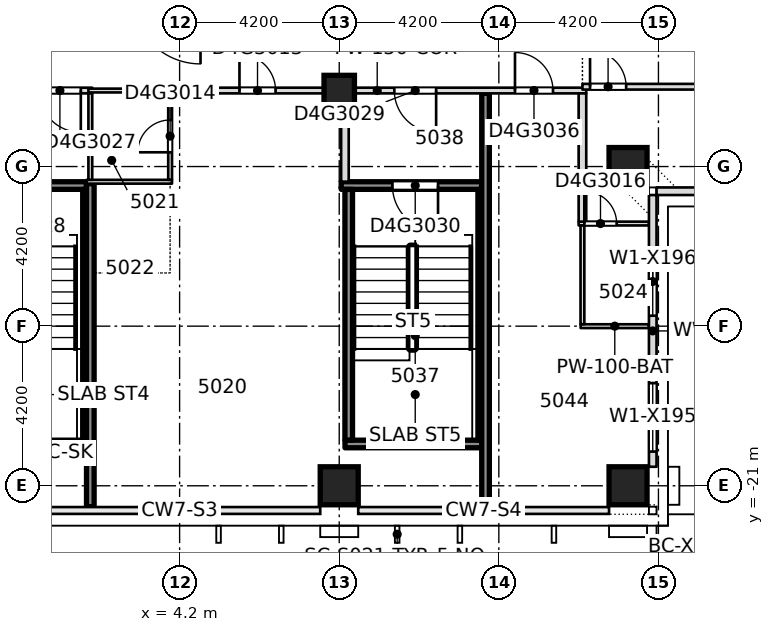
"""IFC4 building model, lengths in metres.
Left out: names, types, materials, properties, quantities, classifications, styles, units other than length and angle.
Written with IfcOpenShell. Run it as: python <this file> out.ifc"""

import sys

from ifc_helpers import new_model, si_unit, direction, frame, frame_2d, origin, origin_2d, place, context, subcontext, project, spatial, rectangle, extrude, element, fill, save


model = new_model("IFC4")
c1 = context("Model", 3, precision=1e-05, world=origin(), true_north=direction((0.0, 1.0)))
c2 = subcontext(c1, "Body", "Model", "MODEL_VIEW")
j1 = project(units=[si_unit("LENGTHUNIT", "METRE"), si_unit("PLANEANGLEUNIT", "RADIAN")], contexts=[c1])
p1 = place(None, origin())
s1 = spatial("IfcSite", under=j1, at=p1, CompositionType="ELEMENT")
p2 = place(p1, origin())
s2 = spatial("IfcBuilding", under=s1, at=p2, CompositionType="ELEMENT")
p3 = place(p2, frame((0.0, 0.0, 192.8)))
s3 = spatial("IfcBuildingStorey", under=s2, at=p3, CompositionType="ELEMENT", Elevation=192.8)
for number, where, z_axis, x_axis in (
    (1, (8.4, -21.0, -0.4), (0.0, 0.0, 1.0), (1.0, 0.0, 0.0)),
    (2, (16.0, -21.0, -0.4), (0.0, 0.0, 1.0), (1.0, 0.0, 0.0)),
    (3, (16.0, -12.6, -0.4), (0.0, 0.0, 1.0), (1.0, 0.0, 0.0)),
):
    element("IfcColumn", number, at=place(p3, frame(where, z_axis=z_axis, x_axis=x_axis)), inside=s3, PredefinedType="COLUMN", context=c2, shape_type="SweptSolid", body=[
        extrude(rectangle(XDim=1.0, YDim=1.0, at=origin_2d()), origin(), (0.0, 0.0, 1.0), 3.45),
    ])
p4 = place(p3, frame((8.4, -10.6, -0.4), z_axis=(0.0, 0.0, 1.0), x_axis=(1.0, 0.0, 0.0)))
e4 = element("IfcColumn", 4, at=p4, inside=s3, PredefinedType="COLUMN", context=c2, shape_type="SweptSolid", body=[
    extrude(rectangle(XDim=0.8, YDim=0.8, at=origin_2d()), origin(), (0.0, 0.0, 1.0), 3.45),
])
p5 = place(p3, frame((-1.848, -19.9, 0.0), z_axis=(0.0, 0.0, 1.0), x_axis=(1.0, 0.0, 0.0)))
e5 = element("IfcWall", 5, at=p5, inside=s3, PredefinedType="SOLIDWALL", context=c2, shape_type="SweptSolid", body=[
    extrude(rectangle(XDim=3.696, YDim=0.2, at=frame_2d((1.848, 0.0))), origin(), (0.0, 0.0, 1.0), 3.05),
])
p6 = place(p3, frame((8.552, -19.9, 0.0), z_axis=(0.0, 0.0, 1.0), x_axis=(1.0, 0.0, 0.0)))
e6 = element("IfcWall", 6, at=p6, inside=s3, PredefinedType="SOLIDWALL", context=c2, shape_type="SweptSolid", body=[
    extrude(rectangle(XDim=3.696, YDim=0.2, at=frame_2d((1.848, 0.0))), origin(), (0.0, 0.0, 1.0), 3.05),
])
p7 = place(p3, frame((14.752, -16.8, 0.0), z_axis=(0.0, 0.0, 1.0), x_axis=(1.0, 0.0, 0.0)))
e7 = element("IfcWall", 7, at=p7, inside=s3, PredefinedType="PARTITIONING", context=c2, shape_type="SweptSolid", body=[
    extrude(rectangle(XDim=1.798, YDim=0.1, at=frame_2d((0.899, 0.0))), origin(), (0.0, 0.0, 1.0), 3.05),
])
p8 = place(p3, frame((14.7, -14.1, 0.0), z_axis=(0.0, 0.0, 1.0), x_axis=(1.0, 0.0, 0.0)))
e8 = element("IfcWall", 8, at=p8, inside=s3, PredefinedType="PARTITIONING", context=c2, shape_type="SweptSolid", body=[
    extrude(rectangle(XDim=1.85, YDim=0.1, at=frame_2d((0.925, 0.0))), origin(), (0.0, 0.0, 1.0), 3.05),
])
p9 = place(p8, frame((0.15, 0.0, 0.0)))
e9 = element("IfcOpeningElement", 9, at=p9, cuts=e8, PredefinedType="OPENING", context=c2, shape_type="SweptSolid", body=[
    extrude(rectangle(XDim=0.85, YDim=2.1, at=frame_2d((0.425, 1.05))), frame((0.0, 0.06, 0.0), z_axis=(0.0, -1.0, 0.0), x_axis=(1.0, 0.0, 0.0)), (0.0, 0.0, 1.0), 0.12),
])
p10 = place(p3, frame((-1.798, -13.1, 0.0), z_axis=(0.0, 0.0, 1.0), x_axis=(1.0, 0.0, 0.0)))
e10 = element("IfcWall", 10, at=p10, inside=s3, PredefinedType="SOLIDWALL", context=c2, shape_type="SweptSolid", body=[
    extrude(rectangle(XDim=3.546, YDim=0.2, at=frame_2d((1.773, 0.0))), origin(), (0.0, 0.0, 1.0), 3.05),
])
p11 = place(p10, frame((1.198, 0.0, 0.0)))
e11 = element("IfcOpeningElement", 11, at=p11, cuts=e10, PredefinedType="OPENING", context=c2, shape_type="SweptSolid", body=[
    extrude(rectangle(XDim=1.2, YDim=2.1, at=frame_2d((0.6, 1.05))), frame((0.0, 0.11, 0.0), z_axis=(0.0, -1.0, 0.0), x_axis=(1.0, 0.0, 0.0)), (0.0, 0.0, 1.0), 0.22),
])
p12 = place(p3, frame((8.452, -13.1, 0.0), z_axis=(0.0, 0.0, 1.0), x_axis=(1.0, 0.0, 0.0)))
e12 = element("IfcWall", 12, at=p12, inside=s3, PredefinedType="SOLIDWALL", context=c2, shape_type="SweptSolid", body=[
    extrude(rectangle(XDim=3.696, YDim=0.2, at=frame_2d((1.848, 0.0))), origin(), (0.0, 0.0, 1.0), 3.05),
])
p13 = place(p12, frame((1.348, 0.0, 0.0)))
e13 = element("IfcOpeningElement", 13, at=p13, cuts=e12, PredefinedType="OPENING", context=c2, shape_type="SweptSolid", body=[
    extrude(rectangle(XDim=1.2, YDim=2.1, at=frame_2d((0.6, 1.05))), frame((0.0, 0.11, 0.0), z_axis=(0.0, -1.0, 0.0), x_axis=(1.0, 0.0, 0.0)), (0.0, 0.0, 1.0), 0.22),
])
p14 = place(p3, frame((1.75, -13.0, 0.0), z_axis=(0.0, 0.0, 1.0), x_axis=(1.0, 0.0, 0.0)))
e14 = element("IfcWall", 14, at=p14, inside=s3, PredefinedType="PARTITIONING", context=c2, shape_type="SweptSolid", body=[
    extrude(rectangle(XDim=2.25, YDim=0.1, at=frame_2d((1.125, 0.0))), origin(), (0.0, 0.0, 1.0), 3.05),
])
p15 = place(p3, frame((-1.9, -10.6, 0.0), z_axis=(0.0, 0.0, 1.0), x_axis=(1.0, 0.0, 0.0)))
e15 = element("IfcWall", 15, at=p15, inside=s3, PredefinedType="PARTITIONING", context=c2, shape_type="SweptSolid", body=[
    extrude(rectangle(XDim=3.8, YDim=0.15, at=frame_2d((1.9, 0.0))), origin(), (0.0, 0.0, 1.0), 3.05),
])
p16 = place(p15, frame((2.4, 0.0, 0.0)))
e16 = element("IfcOpeningElement", 16, at=p16, cuts=e15, PredefinedType="OPENING", context=c2, shape_type="SweptSolid", body=[
    extrude(rectangle(XDim=1.1, YDim=2.1, at=frame_2d((0.55, 1.05))), frame((0.0, 0.085, 0.0), z_axis=(0.0, -1.0, 0.0), x_axis=(1.0, 0.0, 0.0)), (0.0, 0.0, 1.0), 0.17),
])
p17 = place(p3, frame((1.8, -10.6, 0.0), z_axis=(0.0, 0.0, 1.0), x_axis=(1.0, 0.0, 0.0)))
e17 = element("IfcWall", 17, at=p17, inside=s3, PredefinedType="PARTITIONING", context=c2, shape_type="SweptSolid", body=[
    extrude(rectangle(XDim=2.2, YDim=0.1, at=frame_2d((1.1, 0.0))), origin(), (0.0, 0.0, 1.0), 3.05),
])
p18 = place(p3, frame((3.9, -10.6, 0.0), z_axis=(0.0, 0.0, 1.0), x_axis=(1.0, 0.0, 0.0)))
e18 = element("IfcWall", 18, at=p18, inside=s3, PredefinedType="PARTITIONING", context=c2, shape_type="SweptSolid", body=[
    extrude(rectangle(XDim=11.0, YDim=0.15, at=frame_2d((5.5, 0.0))), origin(), (0.0, 0.0, 1.0), 3.05),
])
p19 = place(p18, frame((1.875, 0.0, 0.0)))
e19 = element("IfcOpeningElement", 19, at=p19, cuts=e18, PredefinedType="OPENING", context=c2, shape_type="SweptSolid", body=[
    extrude(rectangle(XDim=0.95, YDim=2.1, at=frame_2d((0.475, 1.05))), frame((0.0, 0.085, 0.0), z_axis=(0.0, -1.0, 0.0), x_axis=(1.0, 0.0, 0.0)), (0.0, 0.0, 1.0), 0.17),
])
p20 = place(p18, frame((5.95, 0.0, 0.0)))
e20 = element("IfcOpeningElement", 20, at=p20, cuts=e18, PredefinedType="OPENING", context=c2, shape_type="SweptSolid", body=[
    extrude(rectangle(XDim=1.1, YDim=2.1, at=frame_2d((0.55, 1.05))), frame((0.0, 0.085, 0.0), z_axis=(0.0, -1.0, 0.0), x_axis=(1.0, 0.0, 0.0)), (0.0, 0.0, 1.0), 0.17),
])
p21 = place(p18, frame((9.125, 0.0, 0.0)))
e21 = element("IfcOpeningElement", 21, at=p21, cuts=e18, PredefinedType="OPENING", context=c2, shape_type="SweptSolid", body=[
    extrude(rectangle(XDim=1.0, YDim=2.1, at=frame_2d((0.5, 1.05))), frame((0.0, 0.085, 0.0), z_axis=(0.0, -1.0, 0.0), x_axis=(1.0, 0.0, 0.0)), (0.0, 0.0, 1.0), 0.17),
])
p22 = place(p3, frame((14.8, -10.5, 0.0), z_axis=(0.0, 0.0, 1.0), x_axis=(1.0, 0.0, 0.0)))
e22 = element("IfcWall", 22, at=p22, inside=s3, PredefinedType="PARTITIONING", context=c2, shape_type="SweptSolid", body=[
    extrude(rectangle(XDim=10.95, YDim=0.15, at=frame_2d((5.475, 0.0))), origin(), (0.0, 0.0, 1.0), 3.05),
])
p23 = place(p22, frame((0.2, 0.0, 0.0)))
e23 = element("IfcOpeningElement", 23, at=p23, cuts=e22, PredefinedType="OPENING", context=c2, shape_type="SweptSolid", body=[
    extrude(rectangle(XDim=0.95, YDim=2.1, at=frame_2d((0.475, 1.05))), frame((0.0, 0.085, 0.0), z_axis=(0.0, -1.0, 0.0), x_axis=(1.0, 0.0, 0.0)), (0.0, 0.0, 1.0), 0.17),
])
p24 = place(p3, frame((1.75, -19.798, 0.0), z_axis=(0.0, 0.0, 1.0), x_axis=(0.0, 1.0, 0.0)))
e24 = element("IfcWall", 24, at=p24, inside=s3, PredefinedType="SOLIDWALL", context=c2, shape_type="SweptSolid", body=[
    extrude(rectangle(XDim=6.596, YDim=0.2, at=frame_2d((3.298, 0.0))), origin(), (0.0, 0.0, 1.0), 3.05),
])
p25 = place(p3, frame((1.85, -12.95, 0.0), z_axis=(0.0, 0.0, 1.0), x_axis=(0.0, 1.0, 0.0)))
e25 = element("IfcWall", 25, at=p25, inside=s3, PredefinedType="PARTITIONING", context=c2, shape_type="SweptSolid", body=[
    extrude(rectangle(XDim=2.275, YDim=0.1, at=frame_2d((1.137, 0.0))), origin(), (0.0, 0.0, 1.0), 3.05),
])
p26 = place(p3, frame((3.95, -12.95, 0.0), z_axis=(0.0, 0.0, 1.0), x_axis=(0.0, 1.0, 0.0)))
e26 = element("IfcWall", 26, at=p26, inside=s3, PredefinedType="PARTITIONING", context=c2, shape_type="SweptSolid", body=[
    extrude(rectangle(XDim=2.275, YDim=0.1, at=frame_2d((1.137, 0.0))), origin(), (0.0, 0.0, 1.0), 3.05),
])
p27 = place(p26, frame((0.725, 0.0, 0.0)))
e27 = element("IfcOpeningElement", 27, at=p27, cuts=e26, PredefinedType="OPENING", context=c2, shape_type="SweptSolid", body=[
    extrude(rectangle(XDim=0.85, YDim=2.1, at=frame_2d((0.425, 1.05))), frame((0.0, 0.06, 0.0), z_axis=(0.0, -1.0, 0.0), x_axis=(1.0, 0.0, 0.0)), (0.0, 0.0, 1.0), 0.12),
])
p28 = place(p3, frame((8.55, -12.998, 0.0), z_axis=(0.0, 0.0, 1.0), x_axis=(0.0, 1.0, 0.0)))
e28 = element("IfcWall", 28, at=p28, inside=s3, PredefinedType="PARTITIONING", context=c2, shape_type="SweptSolid", body=[
    extrude(rectangle(XDim=2.323, YDim=0.2, at=frame_2d((1.162, 0.0))), origin(), (0.0, 0.0, 1.0), 3.05),
])
for number, where, z_axis, x_axis in (
    (29, (8.65, -19.798, 0.0), (0.0, 0.0, 1.0), (0.0, 1.0, 0.0)),
    (30, (12.15, -19.798, 0.0), (0.0, 0.0, 1.0), (0.0, 1.0, 0.0)),
):
    element("IfcWall", number, at=place(p3, frame(where, z_axis=z_axis, x_axis=x_axis)), inside=s3, PredefinedType="SOLIDWALL", context=c2, shape_type="SweptSolid", body=[
        extrude(rectangle(XDim=6.596, YDim=0.2, at=frame_2d((3.298, 0.0))), origin(), (0.0, 0.0, 1.0), 3.05),
    ])
p29 = place(p3, frame((14.8, -16.748, 0.0), z_axis=(0.0, 0.0, 1.0), x_axis=(0.0, 1.0, 0.0)))
e31 = element("IfcWall", 31, at=p29, inside=s3, PredefinedType="PARTITIONING", context=c2, shape_type="SweptSolid", body=[
    extrude(rectangle(XDim=2.598, YDim=0.1, at=frame_2d((1.299, 0.0))), origin(), (0.0, 0.0, 1.0), 3.05),
])
p30 = place(p3, frame((14.8, -14.05, 0.0), z_axis=(0.0, 0.0, 1.0), x_axis=(0.0, 1.0, 0.0)))
e32 = element("IfcWall", 32, at=p30, inside=s3, PredefinedType="PARTITIONING", context=c2, shape_type="SweptSolid", body=[
    extrude(rectangle(XDim=3.375, YDim=0.2, at=frame_2d((1.688, 0.0))), origin(), (0.0, 0.0, 1.0), 3.05),
])
p31 = place(p3, frame((16.65, -20.5, 0.0), z_axis=(0.0, 0.0, 1.0), x_axis=(0.0, 1.0, 0.0)))
e33 = element("IfcWall", 33, at=p31, inside=s3, PredefinedType="STANDARD", context=c2, shape_type="SweptSolid", body=[
    extrude(rectangle(XDim=7.15, YDim=0.2, at=frame_2d((3.575, 0.0))), origin(), (0.0, 0.0, 1.0), 3.05),
])
p32 = place(p31, frame((0.4, 0.0, 0.2)))
e34 = element("IfcOpeningElement", 34, at=p32, cuts=e33, PredefinedType="OPENING", context=c2, shape_type="SweptSolid", body=[
    extrude(rectangle(XDim=1.8, YDim=2.65, at=frame_2d((0.9, 1.325))), frame((0.0, 0.11, 0.0), z_axis=(0.0, -1.0, 0.0), x_axis=(1.0, 0.0, 0.0)), (0.0, 0.0, 1.0), 0.22),
])
p33 = place(p31, frame((3.975, 0.0, 0.2)))
e35 = element("IfcOpeningElement", 35, at=p33, cuts=e33, PredefinedType="OPENING", context=c2, shape_type="SweptSolid", body=[
    extrude(rectangle(XDim=1.8, YDim=2.65, at=frame_2d((0.9, 1.325))), frame((0.0, 0.11, 0.0), z_axis=(0.0, -1.0, 0.0), x_axis=(1.0, 0.0, 0.0)), (0.0, 0.0, 1.0), 0.22),
])
p34 = place(p3, frame((16.75, -13.25, 0.0), z_axis=(0.0, 0.0, 1.0), x_axis=(1.0, 0.0, 0.0)))
e36 = element("IfcWall", 36, at=p34, inside=s3, PredefinedType="STANDARD", context=c2, shape_type="SweptSolid", body=[
    extrude(rectangle(XDim=7.95, YDim=0.2, at=frame_2d((3.975, 0.0))), origin(), (0.0, 0.0, 1.0), 3.05),
])
p35 = place(p3, frame((12.25, -21.55, 0.0), z_axis=(0.0, 0.0, 1.0), x_axis=(0.0, 1.0, 0.0)))
e37 = element("IfcWall", 37, at=p35, inside=s3, PredefinedType="SOLIDWALL", context=c2, shape_type="SweptSolid", body=[
    extrude(rectangle(XDim=10.875, YDim=0.2, at=frame_2d((5.438, 0.0))), origin(), (0.0, 0.0, 1.0), 3.05),
])
p36 = place(p3, frame((1.85, -21.55, 0.0), z_axis=(0.0, 0.0, 1.0), x_axis=(0.0, 1.0, 0.0)))
e38 = element("IfcWall", 38, at=p36, inside=s3, PredefinedType="SOLIDWALL", context=c2, shape_type="SweptSolid", body=[
    extrude(rectangle(XDim=8.5, YDim=0.2, at=frame_2d((4.25, 0.0))), origin(), (0.0, 0.0, 1.0), 3.05),
])
p37 = place(p19, origin())
e39 = element("IfcDoor", 39, at=p37, inside=s3, OperationType="SINGLE_SWING_LEFT", PredefinedType="DOOR", context=c2, shape_type="SweptSolid", body=[
    extrude(rectangle(XDim=0.95, YDim=2.1, at=frame_2d((0.475, 1.05))), frame((0.0, 0.025, 0.0), z_axis=(0.0, -1.0, 0.0), x_axis=(1.0, 0.0, 0.0)), (0.0, 0.0, 1.0), 0.05),
])
fill(e19, e39)
p38 = place(p27, origin())
e40 = element("IfcDoor", 40, at=p38, inside=s3, OperationType="SINGLE_SWING_LEFT", PredefinedType="DOOR", context=c2, shape_type="SweptSolid", body=[
    extrude(rectangle(XDim=0.85, YDim=2.1, at=frame_2d((0.425, 1.05))), frame((0.0, 0.025, 0.0), z_axis=(0.0, -1.0, 0.0), x_axis=(1.0, 0.0, 0.0)), (0.0, 0.0, 1.0), 0.05),
])
fill(e27, e40)
p39 = place(p23, origin())
e41 = element("IfcDoor", 41, at=p39, inside=s3, OperationType="SINGLE_SWING_RIGHT", PredefinedType="DOOR", context=c2, shape_type="SweptSolid", body=[
    extrude(rectangle(XDim=0.95, YDim=2.1, at=frame_2d((0.475, 1.05))), frame((0.0, 0.025, 0.0), z_axis=(0.0, -1.0, 0.0), x_axis=(1.0, 0.0, 0.0)), (0.0, 0.0, 1.0), 0.05),
])
fill(e23, e41)
p40 = place(p9, origin())
e42 = element("IfcDoor", 42, at=p40, inside=s3, OperationType="SINGLE_SWING_RIGHT", PredefinedType="DOOR", context=c2, shape_type="SweptSolid", body=[
    extrude(rectangle(XDim=0.85, YDim=2.1, at=frame_2d((0.425, 1.05))), frame((0.0, 0.025, 0.0), z_axis=(0.0, -1.0, 0.0), x_axis=(1.0, 0.0, 0.0)), (0.0, 0.0, 1.0), 0.05),
])
fill(e9, e42)
p41 = place(p16, origin())
e43 = element("IfcDoor", 43, at=p41, inside=s3, OperationType="SINGLE_SWING_LEFT", PredefinedType="DOOR", context=c2, shape_type="SweptSolid", body=[
    extrude(rectangle(XDim=1.1, YDim=2.1, at=frame_2d((0.55, 1.05))), frame((0.0, 0.025, 0.0), z_axis=(0.0, -1.0, 0.0), x_axis=(1.0, 0.0, 0.0)), (0.0, 0.0, 1.0), 0.05),
])
fill(e16, e43)
p42 = place(p20, origin())
e44 = element("IfcDoor", 44, at=p42, inside=s3, OperationType="SINGLE_SWING_LEFT", PredefinedType="DOOR", context=c2, shape_type="SweptSolid", body=[
    extrude(rectangle(XDim=1.1, YDim=2.1, at=frame_2d((0.55, 1.05))), frame((0.0, 0.025, 0.0), z_axis=(0.0, -1.0, 0.0), x_axis=(1.0, 0.0, 0.0)), (0.0, 0.0, 1.0), 0.05),
])
fill(e20, e44)
p43 = place(p13, origin())
e45 = element("IfcDoor", 45, at=p43, inside=s3, OperationType="SINGLE_SWING_RIGHT", PredefinedType="DOOR", context=c2, shape_type="SweptSolid", body=[
    extrude(rectangle(XDim=1.2, YDim=2.1, at=frame_2d((0.6, 1.05))), frame((0.0, 0.025, 0.0), z_axis=(0.0, -1.0, 0.0), x_axis=(1.0, 0.0, 0.0)), (0.0, 0.0, 1.0), 0.05),
])
fill(e13, e45)
p44 = place(p21, origin())
e46 = element("IfcDoor", 46, at=p44, inside=s3, OperationType="SINGLE_SWING_LEFT", PredefinedType="DOOR", context=c2, shape_type="SweptSolid", body=[
    extrude(rectangle(XDim=1.0, YDim=2.1, at=frame_2d((0.5, 1.05))), frame((0.0, 0.025, 0.0), z_axis=(0.0, -1.0, 0.0), x_axis=(1.0, 0.0, 0.0)), (0.0, 0.0, 1.0), 0.05),
])
fill(e21, e46)
p45 = place(p32, origin())
e47 = element("IfcWindow", 47, at=p45, inside=s3, PartitioningType="SINGLE_PANEL", PredefinedType="WINDOW", context=c2, shape_type="SweptSolid", body=[
    extrude(rectangle(XDim=1.8, YDim=2.65, at=frame_2d((0.9, 1.325))), frame((0.0, 0.03, 0.0), z_axis=(0.0, -1.0, 0.0), x_axis=(1.0, 0.0, 0.0)), (0.0, 0.0, 1.0), 0.06),
])
fill(e34, e47)
p46 = place(p33, origin())
e48 = element("IfcWindow", 48, at=p46, inside=s3, PartitioningType="SINGLE_PANEL", PredefinedType="WINDOW", context=c2, shape_type="SweptSolid", body=[
    extrude(rectangle(XDim=1.8, YDim=2.65, at=frame_2d((0.9, 1.325))), frame((0.0, 0.03, 0.0), z_axis=(0.0, -1.0, 0.0), x_axis=(1.0, 0.0, 0.0)), (0.0, 0.0, 1.0), 0.06),
])
fill(e35, e48)
save(model, sys.argv[1])
